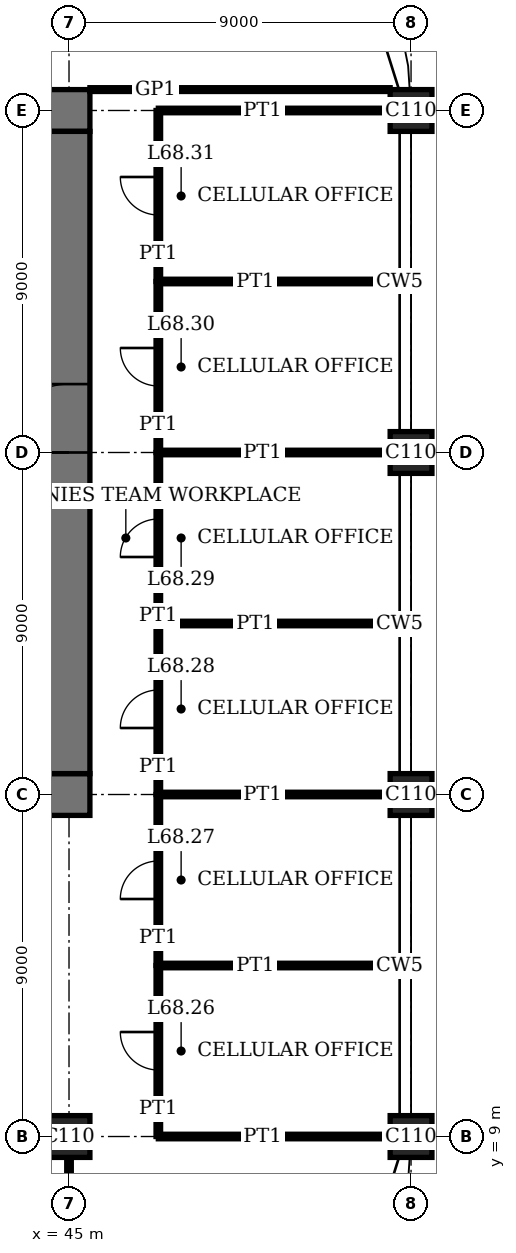
"""IFC4 building model, lengths in metres.
Left out: names, types, materials, properties, quantities, classifications, styles, units other than length and angle.
Written with IfcOpenShell. Run it as: python <this file> out.ifc"""

import sys

from ifc_helpers import new_model, si_unit, direction, frame, frame_2d, origin, origin_2d, place, context, subcontext, project, spatial, rectangle, extrude, element, fill, save


model = new_model("IFC4")
c1 = context("Model", 3, precision=1e-05, world=origin(), true_north=direction((0.0, 1.0)))
c2 = subcontext(c1, "Body", "Model", "MODEL_VIEW")
j1 = project(units=[si_unit("LENGTHUNIT", "METRE"), si_unit("PLANEANGLEUNIT", "RADIAN")], contexts=[c1])
p1 = place(None, origin())
s1 = spatial("IfcSite", under=j1, at=p1, CompositionType="ELEMENT")
p2 = place(p1, origin())
s2 = spatial("IfcBuilding", under=s1, at=p2, CompositionType="ELEMENT")
p3 = place(p2, frame((0.0, 0.0, 279.4)))
s3 = spatial("IfcBuildingStorey", under=s2, at=p3, CompositionType="ELEMENT", Elevation=279.4)
for number, where, z_axis, x_axis in (
    (1, (45.0, 9.0, 0.0), (0.0, 0.0, 1.0), (1.0, 0.0, 0.0)),
    (2, (54.0, 9.0, 0.0), (0.0, 0.0, 1.0), (1.0, 0.0, 0.0)),
    (3, (54.0, 18.0, 0.0), (0.0, 0.0, 1.0), (1.0, 0.0, 0.0)),
    (4, (54.0, 27.0, 0.0), (0.0, 0.0, 1.0), (1.0, 0.0, 0.0)),
    (5, (54.0, 36.0, 0.0), (0.0, 0.0, 1.0), (1.0, 0.0, 0.0)),
):
    element("IfcColumn", number, at=place(p3, frame(where, z_axis=z_axis, x_axis=x_axis)), inside=s3, PredefinedType="COLUMN", context=c2, shape_type="SweptSolid", body=[
        extrude(rectangle(XDim=1.1, YDim=1.1, at=origin_2d()), origin(), (0.0, 0.0, 1.0), 4.0),
    ])
p4 = place(p3, frame((17.45, 18.0, 0.0), z_axis=(0.0, 0.0, 1.0), x_axis=(1.0, 0.0, 0.0)))
e6 = element("IfcWall", 6, at=p4, inside=s3, PredefinedType="SHEAR", context=c2, shape_type="SweptSolid", body=[
    extrude(rectangle(XDim=28.1, YDim=1.1, at=frame_2d((14.05, 0.0))), origin(), (0.0, 0.0, 1.0), 4.0),
])
p5 = place(p4, frame((11.55, 0.0, 0.0)))
e7 = element("IfcOpeningElement", 7, at=p5, cuts=e6, PredefinedType="OPENING", context=c2, shape_type="SweptSolid", body=[
    extrude(rectangle(XDim=1.0, YDim=2.4, at=frame_2d((0.5, 1.2))), frame((0.0, 0.56, 0.0), z_axis=(0.0, -1.0, 0.0), x_axis=(1.0, 0.0, 0.0)), (0.0, 0.0, 1.0), 1.12),
])
p6 = place(p4, frame((16.55, 0.0, 0.0)))
e8 = element("IfcOpeningElement", 8, at=p6, cuts=e6, PredefinedType="OPENING", context=c2, shape_type="SweptSolid", body=[
    extrude(rectangle(XDim=1.0, YDim=2.4, at=frame_2d((0.5, 1.2))), frame((0.0, 0.56, 0.0), z_axis=(0.0, -1.0, 0.0), x_axis=(1.0, 0.0, 0.0)), (0.0, 0.0, 1.0), 1.12),
])
p7 = place(p4, frame((20.0, 0.0, 0.0)))
e9 = element("IfcOpeningElement", 9, at=p7, cuts=e6, PredefinedType="OPENING", context=c2, shape_type="SweptSolid", body=[
    extrude(rectangle(XDim=1.1, YDim=2.4, at=frame_2d((0.55, 1.2))), frame((0.0, 0.56, 0.0), z_axis=(0.0, -1.0, 0.0), x_axis=(1.0, 0.0, 0.0)), (0.0, 0.0, 1.0), 1.12),
])
p8 = place(p4, frame((24.05, 0.0, 0.0)))
e10 = element("IfcOpeningElement", 10, at=p8, cuts=e6, PredefinedType="OPENING", context=c2, shape_type="SweptSolid", body=[
    extrude(rectangle(XDim=1.0, YDim=2.4, at=frame_2d((0.5, 1.2))), frame((0.0, 0.56, 0.0), z_axis=(0.0, -1.0, 0.0), x_axis=(1.0, 0.0, 0.0)), (0.0, 0.0, 1.0), 1.12),
])
p9 = place(p3, frame((45.55, 36.0, 0.0), z_axis=(0.0, 0.0, 1.0), x_axis=(-1.0, 0.0, 0.0)))
e11 = element("IfcWall", 11, at=p9, inside=s3, PredefinedType="SHEAR", context=c2, shape_type="SweptSolid", body=[
    extrude(rectangle(XDim=28.1, YDim=1.1, at=frame_2d((14.05, 0.0))), origin(), (0.0, 0.0, 1.0), 4.0),
])
p10 = place(p9, frame((11.55, 0.0, 0.0)))
e12 = element("IfcOpeningElement", 12, at=p10, cuts=e11, PredefinedType="OPENING", context=c2, shape_type="SweptSolid", body=[
    extrude(rectangle(XDim=1.0, YDim=2.4, at=frame_2d((0.5, 1.2))), frame((0.0, 0.56, 0.0), z_axis=(0.0, -1.0, 0.0), x_axis=(1.0, 0.0, 0.0)), (0.0, 0.0, 1.0), 1.12),
])
p11 = place(p9, frame((16.55, 0.0, 0.0)))
e13 = element("IfcOpeningElement", 13, at=p11, cuts=e11, PredefinedType="OPENING", context=c2, shape_type="SweptSolid", body=[
    extrude(rectangle(XDim=1.0, YDim=2.4, at=frame_2d((0.5, 1.2))), frame((0.0, 0.56, 0.0), z_axis=(0.0, -1.0, 0.0), x_axis=(1.0, 0.0, 0.0)), (0.0, 0.0, 1.0), 1.12),
])
p12 = place(p9, frame((20.0, 0.0, 0.0)))
e14 = element("IfcOpeningElement", 14, at=p12, cuts=e11, PredefinedType="OPENING", context=c2, shape_type="SweptSolid", body=[
    extrude(rectangle(XDim=1.1, YDim=2.4, at=frame_2d((0.55, 1.2))), frame((0.0, 0.56, 0.0), z_axis=(0.0, -1.0, 0.0), x_axis=(1.0, 0.0, 0.0)), (0.0, 0.0, 1.0), 1.12),
])
p13 = place(p9, frame((24.05, 0.0, 0.0)))
e15 = element("IfcOpeningElement", 15, at=p13, cuts=e11, PredefinedType="OPENING", context=c2, shape_type="SweptSolid", body=[
    extrude(rectangle(XDim=1.0, YDim=2.4, at=frame_2d((0.5, 1.2))), frame((0.0, 0.56, 0.0), z_axis=(0.0, -1.0, 0.0), x_axis=(1.0, 0.0, 0.0)), (0.0, 0.0, 1.0), 1.12),
])
p14 = place(p3, frame((45.0, 18.55, 0.0), z_axis=(0.0, 0.0, 1.0), x_axis=(0.0, 1.0, 0.0)))
e16 = element("IfcWall", 16, at=p14, inside=s3, PredefinedType="SHEAR", context=c2, shape_type="SweptSolid", body=[
    extrude(rectangle(XDim=16.9, YDim=1.1, at=frame_2d((8.45, 0.0))), origin(), (0.0, 0.0, 1.0), 4.0),
])
p15 = place(p14, frame((8.45, 0.0, 0.0)))
e17 = element("IfcOpeningElement", 17, at=p15, cuts=e16, PredefinedType="OPENING", context=c2, shape_type="SweptSolid", body=[
    extrude(rectangle(XDim=1.8, YDim=2.4, at=frame_2d((0.9, 1.2))), frame((0.0, 0.56, 0.0), z_axis=(0.0, -1.0, 0.0), x_axis=(1.0, 0.0, 0.0)), (0.0, 0.0, 1.0), 1.12),
])
p16 = place(p3, frame((47.35, 9.0, 0.0), z_axis=(0.0, 0.0, 1.0), x_axis=(1.0, 0.0, 0.0)))
e18 = element("IfcWall", 18, at=p16, inside=s3, PredefinedType="PARTITIONING", context=c2, shape_type="SweptSolid", body=[
    extrude(rectangle(XDim=6.1, YDim=0.12, at=frame_2d((3.05, 0.0))), origin(), (0.0, 0.0, 1.0), 3.05),
])
p17 = place(p3, frame((47.35, 13.5, 0.0), z_axis=(0.0, 0.0, 1.0), x_axis=(1.0, 0.0, 0.0)))
e19 = element("IfcWall", 19, at=p17, inside=s3, PredefinedType="PARTITIONING", context=c2, shape_type="SweptSolid", body=[
    extrude(rectangle(XDim=6.34, YDim=0.12, at=frame_2d((3.17, 0.0))), origin(), (0.0, 0.0, 1.0), 3.1),
])
p18 = place(p3, frame((47.35, 18.0, 0.0), z_axis=(0.0, 0.0, 1.0), x_axis=(1.0, 0.0, 0.0)))
e20 = element("IfcWall", 20, at=p18, inside=s3, PredefinedType="PARTITIONING", context=c2, shape_type="SweptSolid", body=[
    extrude(rectangle(XDim=6.1, YDim=0.12, at=frame_2d((3.05, 0.0))), origin(), (0.0, 0.0, 1.0), 3.05),
])
p19 = place(p3, frame((47.35, 22.5, 0.0), z_axis=(0.0, 0.0, 1.0), x_axis=(1.0, 0.0, 0.0)))
e21 = element("IfcWall", 21, at=p19, inside=s3, PredefinedType="PARTITIONING", context=c2, shape_type="SweptSolid", body=[
    extrude(rectangle(XDim=6.34, YDim=0.12, at=frame_2d((3.17, 0.0))), origin(), (0.0, 0.0, 1.0), 3.1),
])
p20 = place(p3, frame((47.35, 27.0, 0.0), z_axis=(0.0, 0.0, 1.0), x_axis=(1.0, 0.0, 0.0)))
e22 = element("IfcWall", 22, at=p20, inside=s3, PredefinedType="PARTITIONING", context=c2, shape_type="SweptSolid", body=[
    extrude(rectangle(XDim=6.1, YDim=0.12, at=frame_2d((3.05, 0.0))), origin(), (0.0, 0.0, 1.0), 3.05),
])
p21 = place(p3, frame((47.35, 31.5, 0.0), z_axis=(0.0, 0.0, 1.0), x_axis=(1.0, 0.0, 0.0)))
e23 = element("IfcWall", 23, at=p21, inside=s3, PredefinedType="PARTITIONING", context=c2, shape_type="SweptSolid", body=[
    extrude(rectangle(XDim=6.34, YDim=0.12, at=frame_2d((3.17, 0.0))), origin(), (0.0, 0.0, 1.0), 3.1),
])
p22 = place(p3, frame((47.35, 36.0, 0.0), z_axis=(0.0, 0.0, 1.0), x_axis=(1.0, 0.0, 0.0)))
e24 = element("IfcWall", 24, at=p22, inside=s3, PredefinedType="PARTITIONING", context=c2, shape_type="SweptSolid", body=[
    extrude(rectangle(XDim=6.1, YDim=0.12, at=frame_2d((3.05, 0.0))), origin(), (0.0, 0.0, 1.0), 3.05),
])
p23 = place(p3, frame((45.55, 36.55, 0.0), z_axis=(0.0, 0.0, 1.0), x_axis=(1.0, 0.0, 0.0)))
e25 = element("IfcWall", 25, at=p23, inside=s3, PredefinedType="PARTITIONING", context=c2, shape_type="SweptSolid", body=[
    extrude(rectangle(XDim=7.9, YDim=0.1, at=frame_2d((3.95, 0.0))), origin(), (0.0, 0.0, 1.0), 3.75),
])
p24 = place(p3, frame((45.0, 5.4, 0.0), z_axis=(0.0, 0.0, 1.0), x_axis=(0.0, 1.0, 0.0)))
e26 = element("IfcWall", 26, at=p24, inside=s3, PredefinedType="PARTITIONING", context=c2, shape_type="SweptSolid", body=[
    extrude(rectangle(XDim=3.05, YDim=0.12, at=frame_2d((1.525, 0.0))), origin(), (0.0, 0.0, 1.0), 3.05),
])
p25 = place(p3, frame((47.35, 9.0, 0.0), z_axis=(0.0, 0.0, 1.0), x_axis=(0.0, 1.0, 0.0)))
e27 = element("IfcWall", 27, at=p25, inside=s3, PredefinedType="PARTITIONING", context=c2, shape_type="SweptSolid", body=[
    extrude(rectangle(XDim=4.5, YDim=0.12, at=frame_2d((2.25, 0.0))), origin(), (0.0, 0.0, 1.0), 3.75),
])
p26 = place(p25, frame((1.75, 0.0, 0.0)))
e28 = element("IfcOpeningElement", 28, at=p26, cuts=e27, PredefinedType="OPENING", context=c2, shape_type="SweptSolid", body=[
    extrude(rectangle(XDim=1.0, YDim=2.4, at=frame_2d((0.5, 1.2))), frame((0.0, 0.07, 0.0), z_axis=(0.0, -1.0, 0.0), x_axis=(1.0, 0.0, 0.0)), (0.0, 0.0, 1.0), 0.14),
])
p27 = place(p3, frame((47.35, 13.5, 0.0), z_axis=(0.0, 0.0, 1.0), x_axis=(0.0, 1.0, 0.0)))
e29 = element("IfcWall", 29, at=p27, inside=s3, PredefinedType="PARTITIONING", context=c2, shape_type="SweptSolid", body=[
    extrude(rectangle(XDim=4.5, YDim=0.12, at=frame_2d((2.25, 0.0))), origin(), (0.0, 0.0, 1.0), 3.75),
])
p28 = place(p27, frame((1.75, 0.0, 0.0)))
e30 = element("IfcOpeningElement", 30, at=p28, cuts=e29, PredefinedType="OPENING", context=c2, shape_type="SweptSolid", body=[
    extrude(rectangle(XDim=1.0, YDim=2.4, at=frame_2d((0.5, 1.2))), frame((0.0, 0.07, 0.0), z_axis=(0.0, -1.0, 0.0), x_axis=(1.0, 0.0, 0.0)), (0.0, 0.0, 1.0), 0.14),
])
p29 = place(p3, frame((47.35, 18.0, 0.0), z_axis=(0.0, 0.0, 1.0), x_axis=(0.0, 1.0, 0.0)))
e31 = element("IfcWall", 31, at=p29, inside=s3, PredefinedType="PARTITIONING", context=c2, shape_type="SweptSolid", body=[
    extrude(rectangle(XDim=4.5, YDim=0.12, at=frame_2d((2.25, 0.0))), origin(), (0.0, 0.0, 1.0), 3.75),
])
p30 = place(p29, frame((1.75, 0.0, 0.0)))
e32 = element("IfcOpeningElement", 32, at=p30, cuts=e31, PredefinedType="OPENING", context=c2, shape_type="SweptSolid", body=[
    extrude(rectangle(XDim=1.0, YDim=2.4, at=frame_2d((0.5, 1.2))), frame((0.0, 0.07, 0.0), z_axis=(0.0, -1.0, 0.0), x_axis=(1.0, 0.0, 0.0)), (0.0, 0.0, 1.0), 0.14),
])
p31 = place(p3, frame((47.35, 22.5, 0.0), z_axis=(0.0, 0.0, 1.0), x_axis=(0.0, 1.0, 0.0)))
e33 = element("IfcWall", 33, at=p31, inside=s3, PredefinedType="PARTITIONING", context=c2, shape_type="SweptSolid", body=[
    extrude(rectangle(XDim=4.5, YDim=0.12, at=frame_2d((2.25, 0.0))), origin(), (0.0, 0.0, 1.0), 3.75),
])
p32 = place(p31, frame((1.75, 0.0, 0.0)))
e34 = element("IfcOpeningElement", 34, at=p32, cuts=e33, PredefinedType="OPENING", context=c2, shape_type="SweptSolid", body=[
    extrude(rectangle(XDim=1.0, YDim=2.4, at=frame_2d((0.5, 1.2))), frame((0.0, 0.07, 0.0), z_axis=(0.0, -1.0, 0.0), x_axis=(1.0, 0.0, 0.0)), (0.0, 0.0, 1.0), 0.14),
])
p33 = place(p3, frame((47.35, 27.0, 0.0), z_axis=(0.0, 0.0, 1.0), x_axis=(0.0, 1.0, 0.0)))
e35 = element("IfcWall", 35, at=p33, inside=s3, PredefinedType="PARTITIONING", context=c2, shape_type="SweptSolid", body=[
    extrude(rectangle(XDim=4.5, YDim=0.12, at=frame_2d((2.25, 0.0))), origin(), (0.0, 0.0, 1.0), 3.75),
])
p34 = place(p33, frame((1.75, 0.0, 0.0)))
e36 = element("IfcOpeningElement", 36, at=p34, cuts=e35, PredefinedType="OPENING", context=c2, shape_type="SweptSolid", body=[
    extrude(rectangle(XDim=1.0, YDim=2.4, at=frame_2d((0.5, 1.2))), frame((0.0, 0.07, 0.0), z_axis=(0.0, -1.0, 0.0), x_axis=(1.0, 0.0, 0.0)), (0.0, 0.0, 1.0), 0.14),
])
p35 = place(p3, frame((47.35, 31.5, 0.0), z_axis=(0.0, 0.0, 1.0), x_axis=(0.0, 1.0, 0.0)))
e37 = element("IfcWall", 37, at=p35, inside=s3, PredefinedType="PARTITIONING", context=c2, shape_type="SweptSolid", body=[
    extrude(rectangle(XDim=4.5, YDim=0.12, at=frame_2d((2.25, 0.0))), origin(), (0.0, 0.0, 1.0), 3.75),
])
p36 = place(p35, frame((1.75, 0.0, 0.0)))
e38 = element("IfcOpeningElement", 38, at=p36, cuts=e37, PredefinedType="OPENING", context=c2, shape_type="SweptSolid", body=[
    extrude(rectangle(XDim=1.0, YDim=2.4, at=frame_2d((0.5, 1.2))), frame((0.0, 0.07, 0.0), z_axis=(0.0, -1.0, 0.0), x_axis=(1.0, 0.0, 0.0)), (0.0, 0.0, 1.0), 0.14),
])
p37 = place(p15, origin())
e39 = element("IfcDoor", 39, at=p37, inside=s3, OperationType="DOUBLE_DOOR_DOUBLE_SWING", PredefinedType="DOOR", context=c2, shape_type="SweptSolid", body=[
    extrude(rectangle(XDim=1.8, YDim=2.4, at=frame_2d((0.9, 1.2))), frame((0.0, 0.03, 0.0), z_axis=(0.0, -1.0, 0.0), x_axis=(1.0, 0.0, 0.0)), (0.0, 0.0, 1.0), 0.06),
    extrude(rectangle(XDim=0.04, YDim=2.4, at=frame_2d((0.02, 1.2))), frame((0.0, 0.55, 0.0), z_axis=(0.0, -1.0, 0.0), x_axis=(1.0, 0.0, 0.0)), (0.0, 0.0, 1.0), 1.1),
    extrude(rectangle(XDim=0.04, YDim=2.4, at=frame_2d((1.78, 1.2))), frame((0.0, 0.55, 0.0), z_axis=(0.0, -1.0, 0.0), x_axis=(1.0, 0.0, 0.0)), (0.0, 0.0, 1.0), 1.1),
    extrude(rectangle(XDim=1.8, YDim=0.04, at=frame_2d((0.9, 2.38))), frame((0.0, 0.55, 0.0), z_axis=(0.0, -1.0, 0.0), x_axis=(1.0, 0.0, 0.0)), (0.0, 0.0, 1.0), 1.1),
])
fill(e17, e39)
p38 = place(p26, origin())
e40 = element("IfcDoor", 40, at=p38, inside=s3, OperationType="SINGLE_SWING_LEFT", PredefinedType="DOOR", context=c2, shape_type="SweptSolid", body=[
    extrude(rectangle(XDim=1.0, YDim=2.4, at=frame_2d((0.5, 1.2))), frame((0.0, 0.025, 0.0), z_axis=(0.0, -1.0, 0.0), x_axis=(1.0, 0.0, 0.0)), (0.0, 0.0, 1.0), 0.05),
])
fill(e28, e40)
p39 = place(p28, origin())
e41 = element("IfcDoor", 41, at=p39, inside=s3, OperationType="SINGLE_SWING_RIGHT", PredefinedType="DOOR", context=c2, shape_type="SweptSolid", body=[
    extrude(rectangle(XDim=1.0, YDim=2.4, at=frame_2d((0.5, 1.2))), frame((0.0, 0.025, 0.0), z_axis=(0.0, -1.0, 0.0), x_axis=(1.0, 0.0, 0.0)), (0.0, 0.0, 1.0), 0.05),
])
fill(e30, e41)
p40 = place(p30, origin())
e42 = element("IfcDoor", 42, at=p40, inside=s3, OperationType="SINGLE_SWING_RIGHT", PredefinedType="DOOR", context=c2, shape_type="SweptSolid", body=[
    extrude(rectangle(XDim=1.0, YDim=2.4, at=frame_2d((0.5, 1.2))), frame((0.0, 0.025, 0.0), z_axis=(0.0, -1.0, 0.0), x_axis=(1.0, 0.0, 0.0)), (0.0, 0.0, 1.0), 0.05),
])
fill(e32, e42)
p41 = place(p32, origin())
e43 = element("IfcDoor", 43, at=p41, inside=s3, OperationType="SINGLE_SWING_RIGHT", PredefinedType="DOOR", context=c2, shape_type="SweptSolid", body=[
    extrude(rectangle(XDim=1.0, YDim=2.4, at=frame_2d((0.5, 1.2))), frame((0.0, 0.025, 0.0), z_axis=(0.0, -1.0, 0.0), x_axis=(1.0, 0.0, 0.0)), (0.0, 0.0, 1.0), 0.05),
])
fill(e34, e43)
p42 = place(p34, origin())
e44 = element("IfcDoor", 44, at=p42, inside=s3, OperationType="SINGLE_SWING_LEFT", PredefinedType="DOOR", context=c2, shape_type="SweptSolid", body=[
    extrude(rectangle(XDim=1.0, YDim=2.4, at=frame_2d((0.5, 1.2))), frame((0.0, 0.025, 0.0), z_axis=(0.0, -1.0, 0.0), x_axis=(1.0, 0.0, 0.0)), (0.0, 0.0, 1.0), 0.05),
])
fill(e36, e44)
p43 = place(p36, origin())
e45 = element("IfcDoor", 45, at=p43, inside=s3, OperationType="SINGLE_SWING_LEFT", PredefinedType="DOOR", context=c2, shape_type="SweptSolid", body=[
    extrude(rectangle(XDim=1.0, YDim=2.4, at=frame_2d((0.5, 1.2))), frame((0.0, 0.025, 0.0), z_axis=(0.0, -1.0, 0.0), x_axis=(1.0, 0.0, 0.0)), (0.0, 0.0, 1.0), 0.05),
])
fill(e38, e45)
save(model, sys.argv[1])
